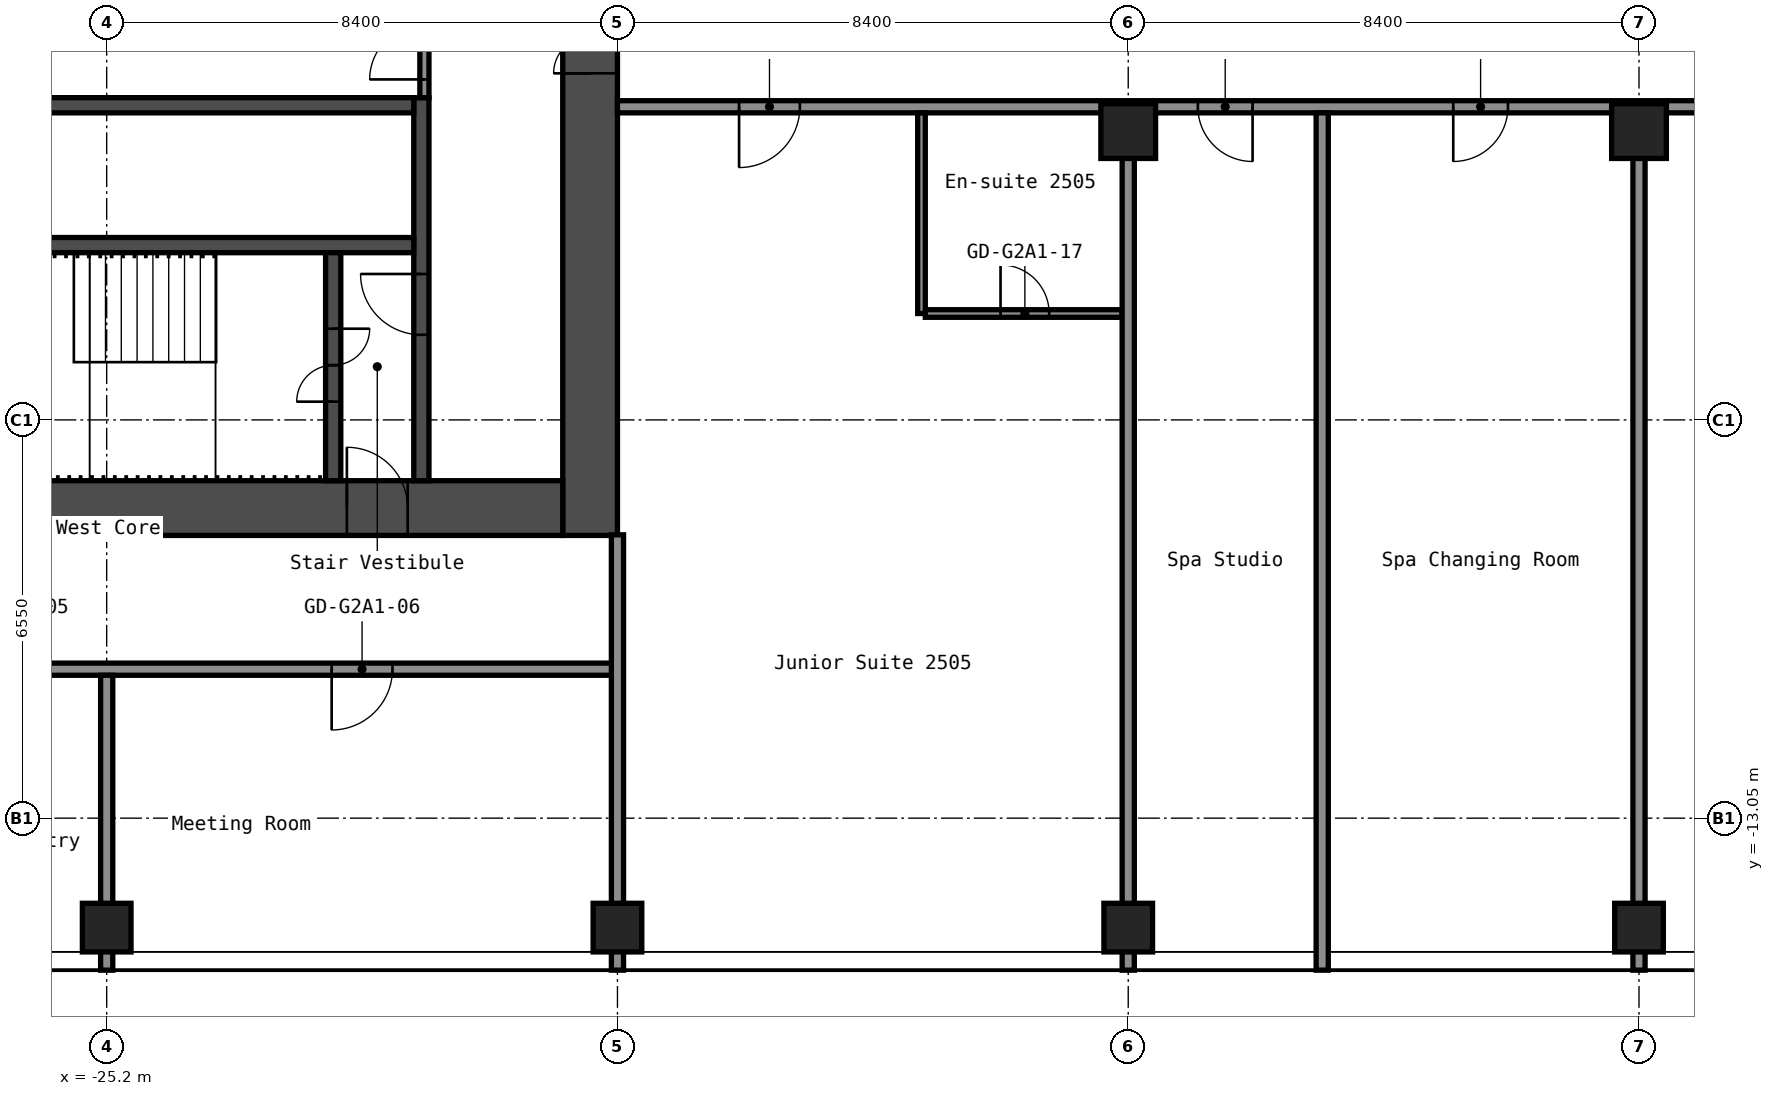
"""IFC4 building model, lengths in metres.
Left out: names, types, materials, properties, quantities, classifications, styles, units other than length and angle.
Written with IfcOpenShell. Run it as: python <this file> out.ifc"""

import sys

from ifc_helpers import new_model, si_unit, direction, frame, frame_2d, origin, origin_2d, place, context, subcontext, project, spatial, rectangle, hollow_rectangle, extrude, element, fill, save


model = new_model("IFC4")
c1 = context("Model", 3, precision=1e-05, world=origin(), true_north=direction((0.0, 1.0)))
c2 = subcontext(c1, "Body", "Model", "MODEL_VIEW")
j1 = project(units=[si_unit("LENGTHUNIT", "METRE"), si_unit("PLANEANGLEUNIT", "RADIAN")], contexts=[c1])
p1 = place(None, origin())
s1 = spatial("IfcSite", under=j1, at=p1, CompositionType="ELEMENT")
p2 = place(p1, origin())
s2 = spatial("IfcBuilding", under=s1, at=p2, CompositionType="ELEMENT")
p3 = place(p2, frame((0.0, 0.0, 91.4)))
s3 = spatial("IfcBuildingStorey", under=s2, at=p3, CompositionType="ELEMENT", Elevation=91.4)
for number, where, z_axis, x_axis in (
    (1, (-25.2, -14.85, 0.0), (0.0, 0.0, 1.0), (1.0, 0.0, 0.0)),
    (2, (-16.8, -14.85, 0.0), (0.0, 0.0, 1.0), (1.0, 0.0, 0.0)),
    (3, (-8.4, -14.85, 0.0), (0.0, 0.0, 1.0), (1.0, 0.0, 0.0)),
):
    element("IfcColumn", number, at=place(p3, frame(where, z_axis=z_axis, x_axis=x_axis)), inside=s3, PredefinedType="COLUMN", context=c2, shape_type="SweptSolid", body=[
        extrude(hollow_rectangle(XDim=0.8, YDim=0.8, WallThickness=0.032, at=origin_2d()), origin(), (0.0, 0.0, 1.0), 2.8),
    ])
p4 = place(p3, frame((-8.4, -1.75, 0.0), z_axis=(0.0, 0.0, 1.0), x_axis=(1.0, 0.0, 0.0)))
e4 = element("IfcColumn", 4, at=p4, inside=s3, PredefinedType="COLUMN", context=c2, shape_type="SweptSolid", body=[
    extrude(hollow_rectangle(XDim=0.9, YDim=0.9, WallThickness=0.036, at=origin_2d()), origin(), (0.0, 0.0, 1.0), 2.8),
])
p5 = place(p3, frame((0.0, -14.85, 0.0), z_axis=(0.0, 0.0, 1.0), x_axis=(1.0, 0.0, 0.0)))
e5 = element("IfcColumn", 5, at=p5, inside=s3, PredefinedType="COLUMN", context=c2, shape_type="SweptSolid", body=[
    extrude(hollow_rectangle(XDim=0.8, YDim=0.8, WallThickness=0.032, at=origin_2d()), origin(), (0.0, 0.0, 1.0), 2.8),
])
p6 = place(p3, frame((0.0, -1.75, 0.0), z_axis=(0.0, 0.0, 1.0), x_axis=(1.0, 0.0, 0.0)))
e6 = element("IfcColumn", 6, at=p6, inside=s3, PredefinedType="COLUMN", context=c2, shape_type="SweptSolid", body=[
    extrude(hollow_rectangle(XDim=0.9, YDim=0.9, WallThickness=0.036, at=origin_2d()), origin(), (0.0, 0.0, 1.0), 2.8),
])
p7 = place(p3, frame((-17.25, -8.4, 0.0), z_axis=(0.0, 0.0, 1.0), x_axis=(0.0, 1.0, 0.0)))
e7 = element("IfcWall", 7, at=p7, inside=s3, PredefinedType="SHEAR", context=c2, shape_type="SweptSolid", body=[
    extrude(rectangle(XDim=16.8, YDim=0.9, at=frame_2d((8.4, 0.0))), origin(), (0.0, 0.0, 1.0), 2.8),
])
p8 = place(p7, frame((7.6, 0.0, 0.0)))
e8 = element("IfcOpeningElement", 8, at=p8, cuts=e7, PredefinedType="OPENING", context=c2, shape_type="SweptSolid", body=[
    extrude(rectangle(XDim=1.2, YDim=2.1, at=frame_2d((0.6, 1.05))), frame((0.0, 0.46, 0.0), z_axis=(0.0, -1.0, 0.0), x_axis=(1.0, 0.0, 0.0)), (0.0, 0.0, 1.0), 0.92),
])
p9 = place(p3, frame((-32.7, -7.95, 0.0), z_axis=(0.0, 0.0, 1.0), x_axis=(1.0, 0.0, 0.0)))
e9 = element("IfcWall", 9, at=p9, inside=s3, PredefinedType="SHEAR", context=c2, shape_type="SweptSolid", body=[
    extrude(rectangle(XDim=15.0, YDim=0.9, at=frame_2d((7.5, 0.0))), origin(), (0.0, 0.0, 1.0), 2.8),
])
p10 = place(p9, frame((11.45, 0.0, 0.0)))
e10 = element("IfcOpeningElement", 10, at=p10, cuts=e9, PredefinedType="OPENING", context=c2, shape_type="SweptSolid", body=[
    extrude(rectangle(XDim=1.0, YDim=2.1, at=frame_2d((0.5, 1.05))), frame((0.0, 0.46, 0.0), z_axis=(0.0, -1.0, 0.0), x_axis=(1.0, 0.0, 0.0)), (0.0, 0.0, 1.0), 0.92),
])
p11 = place(p3, frame((-20.025, -7.5, 0.0), z_axis=(0.0, 0.0, 1.0), x_axis=(0.0, 1.0, 0.0)))
e11 = element("IfcWall", 11, at=p11, inside=s3, PredefinedType="SHEAR", context=c2, shape_type="SweptSolid", body=[
    extrude(rectangle(XDim=6.3, YDim=0.25, at=frame_2d((3.15, 0.0))), origin(), (0.0, 0.0, 1.0), 2.8),
])
p12 = place(p11, frame((2.4, 0.0, 0.0)))
e12 = element("IfcOpeningElement", 12, at=p12, cuts=e11, PredefinedType="OPENING", context=c2, shape_type="SweptSolid", body=[
    extrude(rectangle(XDim=1.0, YDim=2.1, at=frame_2d((0.5, 1.05))), frame((0.0, 0.135, 0.0), z_axis=(0.0, -1.0, 0.0), x_axis=(1.0, 0.0, 0.0)), (0.0, 0.0, 1.0), 0.27),
])
for number, where, z_axis, x_axis in (
    (13, (-27.65, -1.325, 0.0), (0.0, 0.0, 1.0), (1.0, 0.0, 0.0)),
    (14, (-27.65, -3.625, 0.0), (0.0, 0.0, 1.0), (1.0, 0.0, 0.0)),
):
    element("IfcWall", number, at=place(p3, frame(where, z_axis=z_axis, x_axis=x_axis)), inside=s3, PredefinedType="SHEAR", context=c2, shape_type="SweptSolid", body=[
        extrude(rectangle(XDim=7.5, YDim=0.25, at=frame_2d((3.75, 0.0))), origin(), (0.0, 0.0, 1.0), 2.8),
    ])
p13 = place(p3, frame((-21.475, -7.5, 0.0), z_axis=(0.0, 0.0, 1.0), x_axis=(0.0, 1.0, 0.0)))
e15 = element("IfcWall", 15, at=p13, inside=s3, PredefinedType="SHEAR", context=c2, shape_type="SweptSolid", body=[
    extrude(rectangle(XDim=3.75, YDim=0.25, at=frame_2d((1.875, 0.0))), origin(), (0.0, 0.0, 1.0), 2.8),
])
p14 = place(p13, frame((1.3, 0.0, 0.0)))
e16 = element("IfcOpeningElement", 16, at=p14, cuts=e15, PredefinedType="OPENING", context=c2, shape_type="SweptSolid", body=[
    extrude(rectangle(XDim=1.2, YDim=2.1, at=frame_2d((0.6, 1.05))), frame((0.0, 0.135, 0.0), z_axis=(0.0, -1.0, 0.0), x_axis=(1.0, 0.0, 0.0)), (0.0, 0.0, 1.0), 0.27),
])
p15 = place(p3, frame((-19.975, -1.2, 0.0), z_axis=(0.0, 0.0, 1.0), x_axis=(0.0, 1.0, 0.0)))
e17 = element("IfcWall", 17, at=p15, inside=s3, PredefinedType="PARTITIONING", context=c2, shape_type="SweptSolid", body=[
    extrude(rectangle(XDim=2.4, YDim=0.15, at=frame_2d((1.2, 0.0))), origin(), (0.0, 0.0, 1.0), 2.8),
])
p16 = place(p15, frame((0.3, 0.0, 0.0)))
e18 = element("IfcOpeningElement", 18, at=p16, cuts=e17, PredefinedType="OPENING", context=c2, shape_type="SweptSolid", body=[
    extrude(rectangle(XDim=1.8, YDim=2.1, at=frame_2d((0.9, 1.05))), frame((0.0, 0.085, 0.0), z_axis=(0.0, -1.0, 0.0), x_axis=(1.0, 0.0, 0.0)), (0.0, 0.0, 1.0), 0.17),
])
p17 = place(p3, frame((-46.5, -10.6, 0.0), z_axis=(0.0, 0.0, 1.0), x_axis=(1.0, 0.0, 0.0)))
e19 = element("IfcWall", 19, at=p17, inside=s3, PredefinedType="PARTITIONING", context=c2, shape_type="SweptSolid", body=[
    extrude(rectangle(XDim=29.7, YDim=0.2, at=frame_2d((14.85, 0.0))), origin(), (0.0, 0.0, 1.0), 2.8),
])
p18 = place(p17, frame((1.95, 0.0, 0.0)))
e20 = element("IfcOpeningElement", 20, at=p18, cuts=e19, PredefinedType="OPENING", context=c2, shape_type="SweptSolid", body=[
    extrude(rectangle(XDim=0.9, YDim=2.1, at=frame_2d((0.45, 1.05))), frame((0.0, 0.11, 0.0), z_axis=(0.0, -1.0, 0.0), x_axis=(1.0, 0.0, 0.0)), (0.0, 0.0, 1.0), 0.22),
])
p19 = place(p17, frame((6.455, 0.0, 0.0)))
e21 = element("IfcOpeningElement", 21, at=p19, cuts=e19, PredefinedType="OPENING", context=c2, shape_type="SweptSolid", body=[
    extrude(rectangle(XDim=0.9, YDim=2.1, at=frame_2d((0.45, 1.05))), frame((0.0, 0.11, 0.0), z_axis=(0.0, -1.0, 0.0), x_axis=(1.0, 0.0, 0.0)), (0.0, 0.0, 1.0), 0.22),
])
p20 = place(p17, frame((10.655, 0.0, 0.0)))
e22 = element("IfcOpeningElement", 22, at=p20, cuts=e19, PredefinedType="OPENING", context=c2, shape_type="SweptSolid", body=[
    extrude(rectangle(XDim=0.9, YDim=2.1, at=frame_2d((0.45, 1.05))), frame((0.0, 0.11, 0.0), z_axis=(0.0, -1.0, 0.0), x_axis=(1.0, 0.0, 0.0)), (0.0, 0.0, 1.0), 0.22),
])
p21 = place(p17, frame((15.07, 0.0, 0.0)))
e23 = element("IfcOpeningElement", 23, at=p21, cuts=e19, PredefinedType="OPENING", context=c2, shape_type="SweptSolid", body=[
    extrude(rectangle(XDim=0.9, YDim=2.1, at=frame_2d((0.45, 1.05))), frame((0.0, 0.11, 0.0), z_axis=(0.0, -1.0, 0.0), x_axis=(1.0, 0.0, 0.0)), (0.0, 0.0, 1.0), 0.22),
])
p22 = place(p17, frame((19.27, 0.0, 0.0)))
e24 = element("IfcOpeningElement", 24, at=p22, cuts=e19, PredefinedType="OPENING", context=c2, shape_type="SweptSolid", body=[
    extrude(rectangle(XDim=0.9, YDim=2.1, at=frame_2d((0.45, 1.05))), frame((0.0, 0.11, 0.0), z_axis=(0.0, -1.0, 0.0), x_axis=(1.0, 0.0, 0.0)), (0.0, 0.0, 1.0), 0.22),
])
p23 = place(p17, frame((25.0, 0.0, 0.0)))
e25 = element("IfcOpeningElement", 25, at=p23, cuts=e19, PredefinedType="OPENING", context=c2, shape_type="SweptSolid", body=[
    extrude(rectangle(XDim=1.0, YDim=2.1, at=frame_2d((0.5, 1.05))), frame((0.0, 0.11, 0.0), z_axis=(0.0, -1.0, 0.0), x_axis=(1.0, 0.0, 0.0)), (0.0, 0.0, 1.0), 0.22),
])
p24 = place(p3, frame((-11.738, -4.75, 0.0), z_axis=(0.0, 0.0, 1.0), x_axis=(1.0, 0.0, 0.0)))
e26 = element("IfcWall", 26, at=p24, inside=s3, PredefinedType="PARTITIONING", context=c2, shape_type="SweptSolid", body=[
    extrude(rectangle(XDim=3.238, YDim=0.125, at=frame_2d((1.619, 0.0))), origin(), (0.0, 0.0, 1.0), 2.8),
])
p25 = place(p24, frame((1.238, 0.0, 0.0)))
e27 = element("IfcOpeningElement", 27, at=p25, cuts=e26, PredefinedType="OPENING", context=c2, shape_type="SweptSolid", body=[
    extrude(rectangle(XDim=0.8, YDim=2.1, at=frame_2d((0.4, 1.05))), frame((0.0, 0.073, 0.0), z_axis=(0.0, -1.0, 0.0), x_axis=(1.0, 0.0, 0.0)), (0.0, 0.0, 1.0), 0.145),
])
p26 = place(p3, frame((-16.8, -1.35, 0.0), z_axis=(0.0, 0.0, 1.0), x_axis=(1.0, 0.0, 0.0)))
e28 = element("IfcWall", 28, at=p26, inside=s3, PredefinedType="PARTITIONING", context=c2, shape_type="SweptSolid", body=[
    extrude(rectangle(XDim=33.6, YDim=0.2, at=frame_2d((16.8, 0.0))), origin(), (0.0, 0.0, 1.0), 2.8),
])
p27 = place(p26, frame((2.0, 0.0, 0.0)))
e29 = element("IfcOpeningElement", 29, at=p27, cuts=e28, PredefinedType="OPENING", context=c2, shape_type="SweptSolid", body=[
    extrude(rectangle(XDim=1.0, YDim=2.1, at=frame_2d((0.5, 1.05))), frame((0.0, 0.11, 0.0), z_axis=(0.0, -1.0, 0.0), x_axis=(1.0, 0.0, 0.0)), (0.0, 0.0, 1.0), 0.22),
])
p28 = place(p26, frame((9.545, 0.0, 0.0)))
e30 = element("IfcOpeningElement", 30, at=p28, cuts=e28, PredefinedType="OPENING", context=c2, shape_type="SweptSolid", body=[
    extrude(rectangle(XDim=0.9, YDim=2.1, at=frame_2d((0.45, 1.05))), frame((0.0, 0.11, 0.0), z_axis=(0.0, -1.0, 0.0), x_axis=(1.0, 0.0, 0.0)), (0.0, 0.0, 1.0), 0.22),
])
p29 = place(p26, frame((13.745, 0.0, 0.0)))
e31 = element("IfcOpeningElement", 31, at=p29, cuts=e28, PredefinedType="OPENING", context=c2, shape_type="SweptSolid", body=[
    extrude(rectangle(XDim=0.9, YDim=2.1, at=frame_2d((0.45, 1.05))), frame((0.0, 0.11, 0.0), z_axis=(0.0, -1.0, 0.0), x_axis=(1.0, 0.0, 0.0)), (0.0, 0.0, 1.0), 0.22),
])
p30 = place(p26, frame((18.8, 0.0, 0.0)))
e32 = element("IfcOpeningElement", 32, at=p30, cuts=e28, PredefinedType="OPENING", context=c2, shape_type="SweptSolid", body=[
    extrude(rectangle(XDim=1.0, YDim=2.1, at=frame_2d((0.5, 1.05))), frame((0.0, 0.11, 0.0), z_axis=(0.0, -1.0, 0.0), x_axis=(1.0, 0.0, 0.0)), (0.0, 0.0, 1.0), 0.22),
])
p31 = place(p26, frame((30.6, 0.0, 0.0)))
e33 = element("IfcOpeningElement", 33, at=p31, cuts=e28, PredefinedType="OPENING", context=c2, shape_type="SweptSolid", body=[
    extrude(rectangle(XDim=1.0, YDim=2.1, at=frame_2d((0.5, 1.05))), frame((0.0, 0.11, 0.0), z_axis=(0.0, -1.0, 0.0), x_axis=(1.0, 0.0, 0.0)), (0.0, 0.0, 1.0), 0.22),
])
p32 = place(p3, frame((-25.2, -15.55, 0.0), z_axis=(0.0, 0.0, 1.0), x_axis=(0.0, 1.0, 0.0)))
e34 = element("IfcWall", 34, at=p32, inside=s3, PredefinedType="PARTITIONING", context=c2, shape_type="SweptSolid", body=[
    extrude(rectangle(XDim=4.85, YDim=0.2, at=frame_2d((2.425, 0.0))), origin(), (0.0, 0.0, 1.0), 2.8),
])
p33 = place(p3, frame((-16.8, -15.55, 0.0), z_axis=(0.0, 0.0, 1.0), x_axis=(0.0, 1.0, 0.0)))
e35 = element("IfcWall", 35, at=p33, inside=s3, PredefinedType="PARTITIONING", context=c2, shape_type="SweptSolid", body=[
    extrude(rectangle(XDim=7.16, YDim=0.2, at=frame_2d((3.58, 0.0))), origin(), (0.0, 0.0, 1.0), 2.8),
])
p34 = place(p3, frame((-11.8, -4.75, 0.0), z_axis=(0.0, 0.0, 1.0), x_axis=(0.0, 1.0, 0.0)))
e36 = element("IfcWall", 36, at=p34, inside=s3, PredefinedType="PARTITIONING", context=c2, shape_type="SweptSolid", body=[
    extrude(rectangle(XDim=3.3, YDim=0.125, at=frame_2d((1.65, 0.0))), origin(), (0.0, 0.0, 1.0), 2.8),
])
p35 = place(p3, frame((-8.4, -15.55, 0.0), z_axis=(0.0, 0.0, 1.0), x_axis=(0.0, 1.0, 0.0)))
e37 = element("IfcWall", 37, at=p35, inside=s3, PredefinedType="PARTITIONING", context=c2, shape_type="SweptSolid", body=[
    extrude(rectangle(XDim=13.36, YDim=0.2, at=frame_2d((6.68, 0.0))), origin(), (0.0, 0.0, 1.0), 2.8),
])
p36 = place(p3, frame((-5.21, -15.55, 0.0), z_axis=(0.0, 0.0, 1.0), x_axis=(0.0, 1.0, 0.0)))
e38 = element("IfcWall", 38, at=p36, inside=s3, PredefinedType="PARTITIONING", context=c2, shape_type="SweptSolid", body=[
    extrude(rectangle(XDim=14.1, YDim=0.2, at=frame_2d((7.05, 0.0))), origin(), (0.0, 0.0, 1.0), 2.8),
])
p37 = place(p3, frame((0.0, -15.55, 0.0), z_axis=(0.0, 0.0, 1.0), x_axis=(0.0, 1.0, 0.0)))
e39 = element("IfcWall", 39, at=p37, inside=s3, PredefinedType="PARTITIONING", context=c2, shape_type="SweptSolid", body=[
    extrude(rectangle(XDim=13.36, YDim=0.2, at=frame_2d((6.68, 0.0))), origin(), (0.0, 0.0, 1.0), 2.8),
])
p38 = place(p8, origin())
e40 = element("IfcDoor", 40, at=p38, inside=s3, OperationType="DOUBLE_DOOR_SINGLE_SWING", PredefinedType="DOOR", context=c2, shape_type="SweptSolid", body=[
    extrude(rectangle(XDim=1.2, YDim=2.1, at=frame_2d((0.6, 1.05))), frame((0.0, 0.025, 0.0), z_axis=(0.0, -1.0, 0.0), x_axis=(1.0, 0.0, 0.0)), (0.0, 0.0, 1.0), 0.05),
])
fill(e8, e40)
p39 = place(p10, origin())
e41 = element("IfcDoor", 41, at=p39, inside=s3, OperationType="SINGLE_SWING_RIGHT", PredefinedType="DOOR", context=c2, shape_type="SweptSolid", body=[
    extrude(rectangle(XDim=1.0, YDim=2.1, at=frame_2d((0.5, 1.05))), frame((0.0, 0.025, 0.0), z_axis=(0.0, -1.0, 0.0), x_axis=(1.0, 0.0, 0.0)), (0.0, 0.0, 1.0), 0.05),
])
fill(e10, e41)
p40 = place(p14, origin())
e42 = element("IfcDoor", 42, at=p40, inside=s3, OperationType="DOUBLE_DOOR_SINGLE_SWING", PredefinedType="DOOR", context=c2, shape_type="SweptSolid", body=[
    extrude(rectangle(XDim=1.2, YDim=2.1, at=frame_2d((0.6, 1.05))), frame((0.0, 0.025, 0.0), z_axis=(0.0, -1.0, 0.0), x_axis=(1.0, 0.0, 0.0)), (0.0, 0.0, 1.0), 0.05),
])
fill(e16, e42)
p41 = place(p12, origin())
e43 = element("IfcDoor", 43, at=p41, inside=s3, OperationType="SINGLE_SWING_LEFT", PredefinedType="DOOR", context=c2, shape_type="SweptSolid", body=[
    extrude(rectangle(XDim=1.0, YDim=2.1, at=frame_2d((0.5, 1.05))), frame((0.0, 0.025, 0.0), z_axis=(0.0, -1.0, 0.0), x_axis=(1.0, 0.0, 0.0)), (0.0, 0.0, 1.0), 0.05),
])
fill(e12, e43)
p42 = place(p16, origin())
e44 = element("IfcDoor", 44, at=p42, inside=s3, OperationType="DOUBLE_DOOR_SINGLE_SWING", PredefinedType="DOOR", context=c2, shape_type="SweptSolid", body=[
    extrude(rectangle(XDim=1.8, YDim=2.1, at=frame_2d((0.9, 1.05))), frame((0.0, 0.025, 0.0), z_axis=(0.0, -1.0, 0.0), x_axis=(1.0, 0.0, 0.0)), (0.0, 0.0, 1.0), 0.05),
])
fill(e18, e44)
p43 = place(p23, origin())
e45 = element("IfcDoor", 45, at=p43, inside=s3, OperationType="SINGLE_SWING_LEFT", PredefinedType="DOOR", context=c2, shape_type="SweptSolid", body=[
    extrude(rectangle(XDim=1.0, YDim=2.1, at=frame_2d((0.5, 1.05))), frame((0.0, 0.025, 0.0), z_axis=(0.0, -1.0, 0.0), x_axis=(1.0, 0.0, 0.0)), (0.0, 0.0, 1.0), 0.05),
])
fill(e25, e45)
p44 = place(p25, origin())
e46 = element("IfcDoor", 46, at=p44, inside=s3, OperationType="SINGLE_SWING_RIGHT", PredefinedType="DOOR", context=c2, shape_type="SweptSolid", body=[
    extrude(rectangle(XDim=0.8, YDim=2.1, at=frame_2d((0.4, 1.05))), frame((0.0, 0.025, 0.0), z_axis=(0.0, -1.0, 0.0), x_axis=(1.0, 0.0, 0.0)), (0.0, 0.0, 1.0), 0.05),
])
fill(e27, e46)
p45 = place(p27, origin())
e47 = element("IfcDoor", 47, at=p45, inside=s3, OperationType="SINGLE_SWING_LEFT", PredefinedType="DOOR", context=c2, shape_type="SweptSolid", body=[
    extrude(rectangle(XDim=1.0, YDim=2.1, at=frame_2d((0.5, 1.05))), frame((0.0, 0.025, 0.0), z_axis=(0.0, -1.0, 0.0), x_axis=(1.0, 0.0, 0.0)), (0.0, 0.0, 1.0), 0.05),
])
fill(e29, e47)
p46 = place(p28, origin())
e48 = element("IfcDoor", 48, at=p46, inside=s3, OperationType="SINGLE_SWING_RIGHT", PredefinedType="DOOR", context=c2, shape_type="SweptSolid", body=[
    extrude(rectangle(XDim=0.9, YDim=2.1, at=frame_2d((0.45, 1.05))), frame((0.0, 0.025, 0.0), z_axis=(0.0, -1.0, 0.0), x_axis=(1.0, 0.0, 0.0)), (0.0, 0.0, 1.0), 0.05),
])
fill(e30, e48)
p47 = place(p29, origin())
e49 = element("IfcDoor", 49, at=p47, inside=s3, OperationType="SINGLE_SWING_LEFT", PredefinedType="DOOR", context=c2, shape_type="SweptSolid", body=[
    extrude(rectangle(XDim=0.9, YDim=2.1, at=frame_2d((0.45, 1.05))), frame((0.0, 0.025, 0.0), z_axis=(0.0, -1.0, 0.0), x_axis=(1.0, 0.0, 0.0)), (0.0, 0.0, 1.0), 0.05),
])
fill(e31, e49)
save(model, sys.argv[1])
